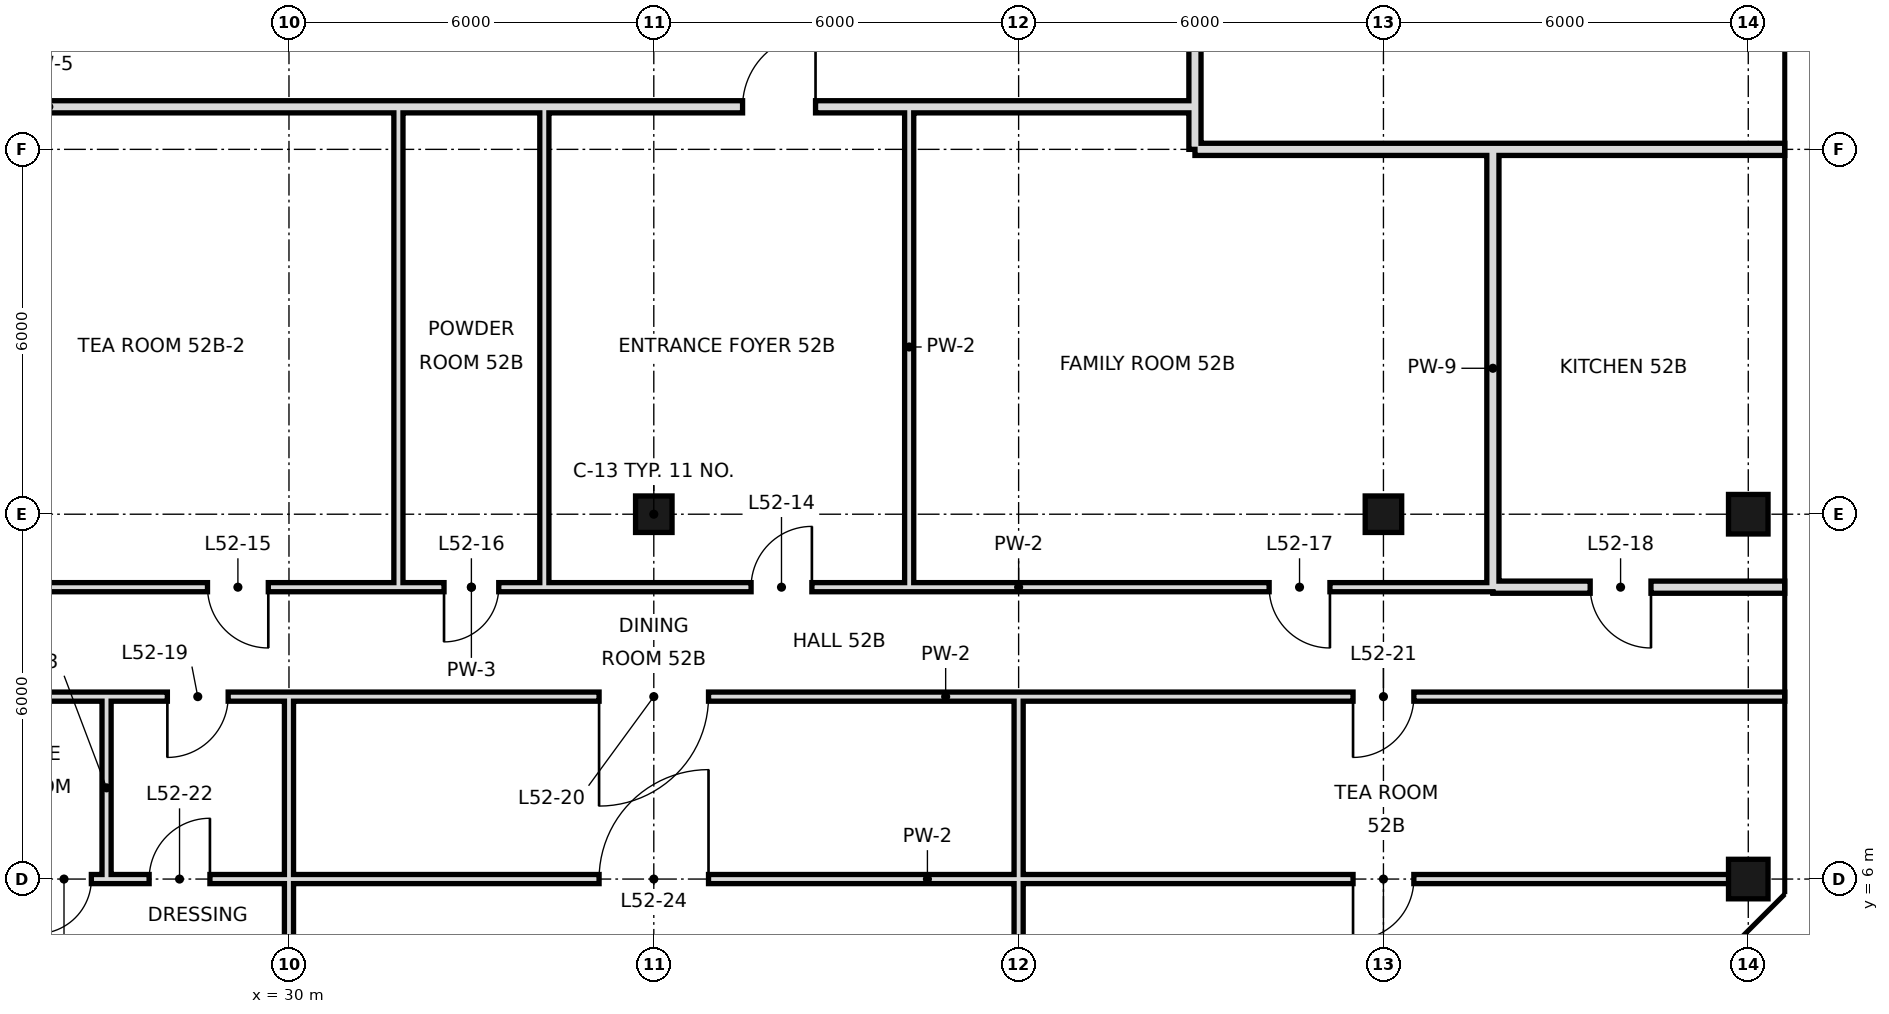
"""IFC4 building model, lengths in metres.
Left out: names, types, materials, properties, quantities, classifications, styles, units other than length and angle.
Written with IfcOpenShell. Run it as: python <this file> out.ifc"""

import sys

from ifc_helpers import new_model, si_unit, direction, frame, frame_2d, origin, origin_2d, place, context, subcontext, project, spatial, rectangle, hollow_rectangle, extrude, element, fill, save


model = new_model("IFC4")
c1 = context("Model", 3, precision=1e-05, world=origin(), true_north=direction((0.0, 1.0)))
c2 = subcontext(c1, "Body", "Model", "MODEL_VIEW")
j1 = project(units=[si_unit("LENGTHUNIT", "METRE"), si_unit("PLANEANGLEUNIT", "RADIAN")], contexts=[c1])
p1 = place(None, origin())
s1 = spatial("IfcSite", under=j1, at=p1, CompositionType="ELEMENT")
p2 = place(p1, origin())
s2 = spatial("IfcBuilding", under=s1, at=p2, CompositionType="ELEMENT")
p3 = place(p2, frame((0.0, 0.0, 222.6)))
s3 = spatial("IfcBuildingStorey", under=s2, at=p3, CompositionType="ELEMENT", Elevation=222.6)
for number, where, z_axis, x_axis in (
    (1, (36.0, 12.0, 0.0), (0.0, 0.0, 1.0), (1.0, 0.0, 0.0)),
    (2, (48.0, 12.0, 0.0), (0.0, 0.0, 1.0), (1.0, 0.0, 0.0)),
):
    element("IfcColumn", number, at=place(p3, frame(where, z_axis=z_axis, x_axis=x_axis)), inside=s3, PredefinedType="COLUMN", context=c2, shape_type="SweptSolid", body=[
        extrude(hollow_rectangle(XDim=0.6, YDim=0.6, WallThickness=0.028, at=origin_2d()), origin(), (0.0, 0.0, 1.0), 3.6),
    ])
for number, where, z_axis, x_axis in (
    (3, (54.0, 6.0, 0.0), (0.0, 0.0, 1.0), (1.0, 0.0, 0.0)),
    (4, (54.0, 12.0, 0.0), (0.0, 0.0, 1.0), (1.0, 0.0, 0.0)),
):
    element("IfcColumn", number, at=place(p3, frame(where, z_axis=z_axis, x_axis=x_axis)), inside=s3, PredefinedType="COLUMN", context=c2, shape_type="SweptSolid", body=[
        extrude(hollow_rectangle(XDim=0.65, YDim=0.65, WallThickness=0.032, at=origin_2d()), origin(), (0.0, 0.0, 1.0), 3.6),
    ])
p4 = place(p3, frame((27.0, 6.0, 0.0), z_axis=(0.0, 0.0, 1.0), x_axis=(0.0, 1.0, 0.0)))
e5 = element("IfcWall", 5, at=p4, inside=s3, PredefinedType="PARTITIONING", context=c2, shape_type="SweptSolid", body=[
    extrude(rectangle(XDim=3.0, YDim=0.15, at=frame_2d((1.5, 0.0))), origin(), (0.0, 0.0, 1.0), 3.42),
])
p5 = place(p3, frame((30.0, -0.6, 0.0), z_axis=(0.0, 0.0, 1.0), x_axis=(0.0, 1.0, 0.0)))
e6 = element("IfcWall", 6, at=p5, inside=s3, PredefinedType="PARTITIONING", context=c2, shape_type="SweptSolid", body=[
    extrude(rectangle(XDim=9.6, YDim=0.15, at=frame_2d((4.8, 0.0))), origin(), (0.0, 0.0, 1.0), 2.72),
])
for number, where, z_axis, x_axis in (
    (7, (31.8, 10.8, 0.0), (0.0, 0.0, 1.0), (0.0, 1.0, 0.0)),
    (8, (34.2, 10.8, 0.0), (0.0, 0.0, 1.0), (0.0, 1.0, 0.0)),
    (9, (40.2, 10.8, 0.0), (0.0, 0.0, 1.0), (0.0, 1.0, 0.0)),
):
    element("IfcWall", number, at=place(p3, frame(where, z_axis=z_axis, x_axis=x_axis)), inside=s3, PredefinedType="PARTITIONING", context=c2, shape_type="SweptSolid", body=[
        extrude(rectangle(XDim=7.9, YDim=0.15, at=frame_2d((3.95, 0.0))), origin(), (0.0, 0.0, 1.0), 3.42),
    ])
p6 = place(p3, frame((42.0, -0.6, 0.0), z_axis=(0.0, 0.0, 1.0), x_axis=(0.0, 1.0, 0.0)))
e10 = element("IfcWall", 10, at=p6, inside=s3, PredefinedType="PARTITIONING", context=c2, shape_type="SweptSolid", body=[
    extrude(rectangle(XDim=9.6, YDim=0.15, at=frame_2d((4.8, 0.0))), origin(), (0.0, 0.0, 1.0), 2.72),
])
p7 = place(p3, frame((44.9, 18.0, 0.0), z_axis=(0.0, 0.0, 1.0), x_axis=(0.0, 1.0, 0.0)))
e11 = element("IfcWall", 11, at=p7, inside=s3, PredefinedType="SOLIDWALL", context=c2, shape_type="SweptSolid", body=[
    extrude(rectangle(XDim=30.6, YDim=0.2, at=frame_2d((15.3, 0.0))), origin(), (0.0, 0.0, 1.0), 2.72),
])
p8 = place(p7, frame((14.75, 0.0, 0.0)))
e12 = element("IfcOpeningElement", 12, at=p8, cuts=e11, PredefinedType="OPENING", context=c2, shape_type="SweptSolid", body=[
    extrude(rectangle(XDim=1.2, YDim=2.4, at=frame_2d((0.6, 1.2))), frame((0.0, 0.11, 0.0), z_axis=(0.0, -1.0, 0.0), x_axis=(1.0, 0.0, 0.0)), (0.0, 0.0, 1.0), 0.22),
])
p9 = place(p3, frame((49.8, 10.8, 0.0), z_axis=(0.0, 0.0, 1.0), x_axis=(0.0, 1.0, 0.0)))
e13 = element("IfcWall", 13, at=p9, inside=s3, PredefinedType="SOLIDWALL", context=c2, shape_type="SweptSolid", body=[
    extrude(rectangle(XDim=7.2, YDim=0.2, at=frame_2d((3.6, 0.0))), origin(), (0.0, 0.0, 1.0), 2.97),
])
p10 = place(p3, frame((49.8, 10.8, 0.0), z_axis=(0.0, 0.0, 1.0), x_axis=(1.0, 0.0, 0.0)))
e14 = element("IfcWall", 14, at=p10, inside=s3, PredefinedType="SOLIDWALL", context=c2, shape_type="SweptSolid", body=[
    extrude(rectangle(XDim=4.8, YDim=0.2, at=frame_2d((2.4, 0.0))), origin(), (0.0, 0.0, 1.0), 2.97),
])
p11 = place(p10, frame((1.6, 0.0, 0.0)))
e15 = element("IfcOpeningElement", 15, at=p11, cuts=e14, PredefinedType="OPENING", context=c2, shape_type="SweptSolid", body=[
    extrude(rectangle(XDim=1.0, YDim=2.4, at=frame_2d((0.5, 1.2))), frame((0.0, 0.11, 0.0), z_axis=(0.0, -1.0, 0.0), x_axis=(1.0, 0.0, 0.0)), (0.0, 0.0, 1.0), 0.22),
])
p12 = place(p3, frame((7.2, 10.8, 0.0), z_axis=(0.0, 0.0, 1.0), x_axis=(1.0, 0.0, 0.0)))
e16 = element("IfcWall", 16, at=p12, inside=s3, PredefinedType="PARTITIONING", context=c2, shape_type="SweptSolid", body=[
    extrude(rectangle(XDim=24.6, YDim=0.15, at=frame_2d((12.3, 0.0))), origin(), (0.0, 0.0, 1.0), 3.42),
])
p13 = place(p12, frame((1.6, 0.0, 0.0)))
e17 = element("IfcOpeningElement", 17, at=p13, cuts=e16, PredefinedType="OPENING", context=c2, shape_type="SweptSolid", body=[
    extrude(rectangle(XDim=1.0, YDim=2.4, at=frame_2d((0.5, 1.2))), frame((0.0, 0.085, 0.0), z_axis=(0.0, -1.0, 0.0), x_axis=(1.0, 0.0, 0.0)), (0.0, 0.0, 1.0), 0.17),
])
p14 = place(p12, frame((9.04, 0.0, 0.0)))
e18 = element("IfcOpeningElement", 18, at=p14, cuts=e16, PredefinedType="OPENING", context=c2, shape_type="SweptSolid", body=[
    extrude(rectangle(XDim=1.0, YDim=2.4, at=frame_2d((0.5, 1.2))), frame((0.0, 0.085, 0.0), z_axis=(0.0, -1.0, 0.0), x_axis=(1.0, 0.0, 0.0)), (0.0, 0.0, 1.0), 0.17),
])
p15 = place(p12, frame((21.46, 0.0, 0.0)))
e19 = element("IfcOpeningElement", 19, at=p15, cuts=e16, PredefinedType="OPENING", context=c2, shape_type="SweptSolid", body=[
    extrude(rectangle(XDim=1.0, YDim=2.4, at=frame_2d((0.5, 1.2))), frame((0.0, 0.085, 0.0), z_axis=(0.0, -1.0, 0.0), x_axis=(1.0, 0.0, 0.0)), (0.0, 0.0, 1.0), 0.17),
])
p16 = place(p3, frame((34.2, 10.8, 0.0), z_axis=(0.0, 0.0, 1.0), x_axis=(1.0, 0.0, 0.0)))
e20 = element("IfcWall", 20, at=p16, inside=s3, PredefinedType="PARTITIONING", context=c2, shape_type="SweptSolid", body=[
    extrude(rectangle(XDim=15.6, YDim=0.15, at=frame_2d((7.8, 0.0))), origin(), (0.0, 0.0, 1.0), 3.42),
])
p17 = place(p16, frame((3.4, 0.0, 0.0)))
e21 = element("IfcOpeningElement", 21, at=p17, cuts=e20, PredefinedType="OPENING", context=c2, shape_type="SweptSolid", body=[
    extrude(rectangle(XDim=1.0, YDim=2.4, at=frame_2d((0.5, 1.2))), frame((0.0, 0.085, 0.0), z_axis=(0.0, -1.0, 0.0), x_axis=(1.0, 0.0, 0.0)), (0.0, 0.0, 1.0), 0.17),
])
p18 = place(p16, frame((11.92, 0.0, 0.0)))
e22 = element("IfcOpeningElement", 22, at=p18, cuts=e20, PredefinedType="OPENING", context=c2, shape_type="SweptSolid", body=[
    extrude(rectangle(XDim=1.0, YDim=2.4, at=frame_2d((0.5, 1.2))), frame((0.0, 0.085, 0.0), z_axis=(0.0, -1.0, 0.0), x_axis=(1.0, 0.0, 0.0)), (0.0, 0.0, 1.0), 0.17),
])
p19 = place(p3, frame((31.8, 10.8, 0.0), z_axis=(0.0, 0.0, 1.0), x_axis=(1.0, 0.0, 0.0)))
e23 = element("IfcWall", 23, at=p19, inside=s3, PredefinedType="PARTITIONING", context=c2, shape_type="SweptSolid", body=[
    extrude(rectangle(XDim=2.4, YDim=0.15, at=frame_2d((1.2, 0.0))), origin(), (0.0, 0.0, 1.0), 3.42),
])
p20 = place(p19, frame((0.75, 0.0, 0.0)))
e24 = element("IfcOpeningElement", 24, at=p20, cuts=e23, PredefinedType="OPENING", context=c2, shape_type="SweptSolid", body=[
    extrude(rectangle(XDim=0.9, YDim=2.4, at=frame_2d((0.45, 1.2))), frame((0.0, 0.085, 0.0), z_axis=(0.0, -1.0, 0.0), x_axis=(1.0, 0.0, 0.0)), (0.0, 0.0, 1.0), 0.17),
])
p21 = place(p3, frame((44.9, 18.0, 0.0), z_axis=(0.0, 0.0, 1.0), x_axis=(1.0, 0.0, 0.0)))
e25 = element("IfcWall", 25, at=p21, inside=s3, PredefinedType="SOLIDWALL", context=c2, shape_type="SweptSolid", body=[
    extrude(rectangle(XDim=4.9, YDim=0.2, at=frame_2d((2.45, 0.0))), origin(), (0.0, 0.0, 1.0), 2.72),
])
p22 = place(p3, frame((49.8, 18.0, 0.0), z_axis=(0.0, 0.0, 1.0), x_axis=(1.0, 0.0, 0.0)))
e26 = element("IfcWall", 26, at=p22, inside=s3, PredefinedType="SOLIDWALL", context=c2, shape_type="SweptSolid", body=[
    extrude(rectangle(XDim=4.8, YDim=0.2, at=frame_2d((2.4, 0.0))), origin(), (0.0, 0.0, 1.0), 2.72),
])
p23 = place(p3, frame((7.2, 18.7, 0.0), z_axis=(0.0, 0.0, 1.0), x_axis=(1.0, 0.0, 0.0)))
e27 = element("IfcWall", 27, at=p23, inside=s3, PredefinedType="SOLIDWALL", context=c2, shape_type="SweptSolid", body=[
    extrude(rectangle(XDim=37.7, YDim=0.2, at=frame_2d((18.85, 0.0))), origin(), (0.0, 0.0, 1.0), 2.72),
])
p24 = place(p23, frame((1.54, 0.0, 0.0)))
e28 = element("IfcOpeningElement", 28, at=p24, cuts=e27, PredefinedType="OPENING", context=c2, shape_type="SweptSolid", body=[
    extrude(rectangle(XDim=1.2, YDim=2.4, at=frame_2d((0.6, 1.2))), frame((0.0, 0.11, 0.0), z_axis=(0.0, -1.0, 0.0), x_axis=(1.0, 0.0, 0.0)), (0.0, 0.0, 1.0), 0.22),
])
p25 = place(p23, frame((30.26, 0.0, 0.0)))
e29 = element("IfcOpeningElement", 29, at=p25, cuts=e27, PredefinedType="OPENING", context=c2, shape_type="SweptSolid", body=[
    extrude(rectangle(XDim=1.2, YDim=2.4, at=frame_2d((0.6, 1.2))), frame((0.0, 0.11, 0.0), z_axis=(0.0, -1.0, 0.0), x_axis=(1.0, 0.0, 0.0)), (0.0, 0.0, 1.0), 0.22),
])
p26 = place(p3, frame((27.0, 6.0, 0.0), z_axis=(0.0, 0.0, 1.0), x_axis=(1.0, 0.0, 0.0)))
e30 = element("IfcWall", 30, at=p26, inside=s3, PredefinedType="PARTITIONING", context=c2, shape_type="SweptSolid", body=[
    extrude(rectangle(XDim=27.0, YDim=0.15, at=frame_2d((13.5, 0.0))), origin(), (0.0, 0.0, 1.0), 2.97),
])
p27 = place(p26, frame((0.7, 0.0, 0.0)))
e31 = element("IfcOpeningElement", 31, at=p27, cuts=e30, PredefinedType="OPENING", context=c2, shape_type="SweptSolid", body=[
    extrude(rectangle(XDim=1.0, YDim=2.4, at=frame_2d((0.5, 1.2))), frame((0.0, 0.085, 0.0), z_axis=(0.0, -1.0, 0.0), x_axis=(1.0, 0.0, 0.0)), (0.0, 0.0, 1.0), 0.17),
])
p28 = place(p26, frame((8.1, 0.0, 0.0)))
e32 = element("IfcOpeningElement", 32, at=p28, cuts=e30, PredefinedType="OPENING", context=c2, shape_type="SweptSolid", body=[
    extrude(rectangle(XDim=1.8, YDim=2.4, at=frame_2d((0.9, 1.2))), frame((0.0, 0.085, 0.0), z_axis=(0.0, -1.0, 0.0), x_axis=(1.0, 0.0, 0.0)), (0.0, 0.0, 1.0), 0.17),
])
p29 = place(p26, frame((20.5, 0.0, 0.0)))
e33 = element("IfcOpeningElement", 33, at=p29, cuts=e30, PredefinedType="OPENING", context=c2, shape_type="SweptSolid", body=[
    extrude(rectangle(XDim=1.0, YDim=2.4, at=frame_2d((0.5, 1.2))), frame((0.0, 0.085, 0.0), z_axis=(0.0, -1.0, 0.0), x_axis=(1.0, 0.0, 0.0)), (0.0, 0.0, 1.0), 0.17),
])
p30 = place(p3, frame((24.0, 6.0, 0.0), z_axis=(0.0, 0.0, 1.0), x_axis=(1.0, 0.0, 0.0)))
e34 = element("IfcWall", 34, at=p30, inside=s3, PredefinedType="PARTITIONING", context=c2, shape_type="SweptSolid", body=[
    extrude(rectangle(XDim=3.0, YDim=0.15, at=frame_2d((1.5, 0.0))), origin(), (0.0, 0.0, 1.0), 2.97),
])
p31 = place(p30, frame((1.85, 0.0, 0.0)))
e35 = element("IfcOpeningElement", 35, at=p31, cuts=e34, PredefinedType="OPENING", context=c2, shape_type="SweptSolid", body=[
    extrude(rectangle(XDim=0.9, YDim=2.4, at=frame_2d((0.45, 1.2))), frame((0.0, 0.085, 0.0), z_axis=(0.0, -1.0, 0.0), x_axis=(1.0, 0.0, 0.0)), (0.0, 0.0, 1.0), 0.17),
])
p32 = place(p3, frame((27.0, 9.0, 0.0), z_axis=(0.0, 0.0, 1.0), x_axis=(1.0, 0.0, 0.0)))
e36 = element("IfcWall", 36, at=p32, inside=s3, PredefinedType="PARTITIONING", context=c2, shape_type="SweptSolid", body=[
    extrude(rectangle(XDim=27.6, YDim=0.15, at=frame_2d((13.8, 0.0))), origin(), (0.0, 0.0, 1.0), 3.42),
])
p33 = place(p32, frame((1.0, 0.0, 0.0)))
e37 = element("IfcOpeningElement", 37, at=p33, cuts=e36, PredefinedType="OPENING", context=c2, shape_type="SweptSolid", body=[
    extrude(rectangle(XDim=1.0, YDim=2.4, at=frame_2d((0.5, 1.2))), frame((0.0, 0.085, 0.0), z_axis=(0.0, -1.0, 0.0), x_axis=(1.0, 0.0, 0.0)), (0.0, 0.0, 1.0), 0.17),
])
p34 = place(p32, frame((8.1, 0.0, 0.0)))
e38 = element("IfcOpeningElement", 38, at=p34, cuts=e36, PredefinedType="OPENING", context=c2, shape_type="SweptSolid", body=[
    extrude(rectangle(XDim=1.8, YDim=2.4, at=frame_2d((0.9, 1.2))), frame((0.0, 0.085, 0.0), z_axis=(0.0, -1.0, 0.0), x_axis=(1.0, 0.0, 0.0)), (0.0, 0.0, 1.0), 0.17),
])
p35 = place(p32, frame((20.5, 0.0, 0.0)))
e39 = element("IfcOpeningElement", 39, at=p35, cuts=e36, PredefinedType="OPENING", context=c2, shape_type="SweptSolid", body=[
    extrude(rectangle(XDim=1.0, YDim=2.4, at=frame_2d((0.5, 1.2))), frame((0.0, 0.085, 0.0), z_axis=(0.0, -1.0, 0.0), x_axis=(1.0, 0.0, 0.0)), (0.0, 0.0, 1.0), 0.17),
])
p36 = place(p3, frame((24.0, 9.0, 0.0), z_axis=(0.0, 0.0, 1.0), x_axis=(1.0, 0.0, 0.0)))
e40 = element("IfcWall", 40, at=p36, inside=s3, PredefinedType="PARTITIONING", context=c2, shape_type="SweptSolid", body=[
    extrude(rectangle(XDim=3.0, YDim=0.15, at=frame_2d((1.5, 0.0))), origin(), (0.0, 0.0, 1.0), 3.42),
])
p37 = place(p17, frame((1.0, 0.0, 0.0), z_axis=(0.0, 0.0, 1.0), x_axis=(-1.0, 0.0, 0.0)))
e41 = element("IfcDoor", 41, at=p37, inside=s3, OperationType="SINGLE_SWING_LEFT", PredefinedType="DOOR", context=c2, shape_type="SweptSolid", body=[
    extrude(rectangle(XDim=1.0, YDim=2.4, at=frame_2d((0.5, 1.2))), frame((0.0, 0.025, 0.0), z_axis=(0.0, -1.0, 0.0), x_axis=(1.0, 0.0, 0.0)), (0.0, 0.0, 1.0), 0.05),
])
fill(e21, e41)
p38 = place(p15, origin())
e42 = element("IfcDoor", 42, at=p38, inside=s3, OperationType="SINGLE_SWING_RIGHT", PredefinedType="DOOR", context=c2, shape_type="SweptSolid", body=[
    extrude(rectangle(XDim=1.0, YDim=2.4, at=frame_2d((0.5, 1.2))), frame((0.0, 0.025, 0.0), z_axis=(0.0, -1.0, 0.0), x_axis=(1.0, 0.0, 0.0)), (0.0, 0.0, 1.0), 0.05),
])
fill(e19, e42)
p39 = place(p20, frame((0.9, 0.0, 0.0), z_axis=(0.0, 0.0, 1.0), x_axis=(-1.0, 0.0, 0.0)))
e43 = element("IfcDoor", 43, at=p39, inside=s3, OperationType="SINGLE_SWING_RIGHT", PredefinedType="DOOR", context=c2, shape_type="SweptSolid", body=[
    extrude(rectangle(XDim=0.9, YDim=2.4, at=frame_2d((0.45, 1.2))), frame((0.0, 0.025, 0.0), z_axis=(0.0, -1.0, 0.0), x_axis=(1.0, 0.0, 0.0)), (0.0, 0.0, 1.0), 0.05),
])
fill(e24, e43)
p40 = place(p18, origin())
e44 = element("IfcDoor", 44, at=p40, inside=s3, OperationType="SINGLE_SWING_RIGHT", PredefinedType="DOOR", context=c2, shape_type="SweptSolid", body=[
    extrude(rectangle(XDim=1.0, YDim=2.4, at=frame_2d((0.5, 1.2))), frame((0.0, 0.025, 0.0), z_axis=(0.0, -1.0, 0.0), x_axis=(1.0, 0.0, 0.0)), (0.0, 0.0, 1.0), 0.05),
])
fill(e22, e44)
p41 = place(p11, origin())
e45 = element("IfcDoor", 45, at=p41, inside=s3, OperationType="SINGLE_SWING_RIGHT", PredefinedType="DOOR", context=c2, shape_type="SweptSolid", body=[
    extrude(rectangle(XDim=1.0, YDim=2.4, at=frame_2d((0.5, 1.2))), frame((0.0, 0.025, 0.0), z_axis=(0.0, -1.0, 0.0), x_axis=(1.0, 0.0, 0.0)), (0.0, 0.0, 1.0), 0.05),
])
fill(e15, e45)
p42 = place(p33, frame((1.0, 0.0, 0.0), z_axis=(0.0, 0.0, 1.0), x_axis=(-1.0, 0.0, 0.0)))
e46 = element("IfcDoor", 46, at=p42, inside=s3, OperationType="SINGLE_SWING_RIGHT", PredefinedType="DOOR", context=c2, shape_type="SweptSolid", body=[
    extrude(rectangle(XDim=1.0, YDim=2.4, at=frame_2d((0.5, 1.2))), frame((0.0, 0.025, 0.0), z_axis=(0.0, -1.0, 0.0), x_axis=(1.0, 0.0, 0.0)), (0.0, 0.0, 1.0), 0.05),
])
fill(e37, e46)
p43 = place(p34, frame((1.8, 0.0, 0.0), z_axis=(0.0, 0.0, 1.0), x_axis=(-1.0, 0.0, 0.0)))
e47 = element("IfcDoor", 47, at=p43, inside=s3, OperationType="SINGLE_SWING_RIGHT", PredefinedType="DOOR", context=c2, shape_type="SweptSolid", body=[
    extrude(rectangle(XDim=1.8, YDim=2.4, at=frame_2d((0.9, 1.2))), frame((0.0, 0.025, 0.0), z_axis=(0.0, -1.0, 0.0), x_axis=(1.0, 0.0, 0.0)), (0.0, 0.0, 1.0), 0.05),
])
fill(e38, e47)
p44 = place(p35, frame((1.0, 0.0, 0.0), z_axis=(0.0, 0.0, 1.0), x_axis=(-1.0, 0.0, 0.0)))
e48 = element("IfcDoor", 48, at=p44, inside=s3, OperationType="SINGLE_SWING_RIGHT", PredefinedType="DOOR", context=c2, shape_type="SweptSolid", body=[
    extrude(rectangle(XDim=1.0, YDim=2.4, at=frame_2d((0.5, 1.2))), frame((0.0, 0.025, 0.0), z_axis=(0.0, -1.0, 0.0), x_axis=(1.0, 0.0, 0.0)), (0.0, 0.0, 1.0), 0.05),
])
fill(e39, e48)
p45 = place(p27, frame((1.0, 0.0, 0.0), z_axis=(0.0, 0.0, 1.0), x_axis=(-1.0, 0.0, 0.0)))
e49 = element("IfcDoor", 49, at=p45, inside=s3, OperationType="SINGLE_SWING_LEFT", PredefinedType="DOOR", context=c2, shape_type="SweptSolid", body=[
    extrude(rectangle(XDim=1.0, YDim=2.4, at=frame_2d((0.5, 1.2))), frame((0.0, 0.025, 0.0), z_axis=(0.0, -1.0, 0.0), x_axis=(1.0, 0.0, 0.0)), (0.0, 0.0, 1.0), 0.05),
])
fill(e31, e49)
p46 = place(p31, frame((0.9, 0.0, 0.0), z_axis=(0.0, 0.0, 1.0), x_axis=(-1.0, 0.0, 0.0)))
e50 = element("IfcDoor", 50, at=p46, inside=s3, OperationType="SINGLE_SWING_RIGHT", PredefinedType="DOOR", context=c2, shape_type="SweptSolid", body=[
    extrude(rectangle(XDim=0.9, YDim=2.4, at=frame_2d((0.45, 1.2))), frame((0.0, 0.025, 0.0), z_axis=(0.0, -1.0, 0.0), x_axis=(1.0, 0.0, 0.0)), (0.0, 0.0, 1.0), 0.05),
])
fill(e35, e50)
p47 = place(p28, frame((1.8, 0.0, 0.0), z_axis=(0.0, 0.0, 1.0), x_axis=(-1.0, 0.0, 0.0)))
e51 = element("IfcDoor", 51, at=p47, inside=s3, OperationType="SINGLE_SWING_LEFT", PredefinedType="DOOR", context=c2, shape_type="SweptSolid", body=[
    extrude(rectangle(XDim=1.8, YDim=2.4, at=frame_2d((0.9, 1.2))), frame((0.0, 0.025, 0.0), z_axis=(0.0, -1.0, 0.0), x_axis=(1.0, 0.0, 0.0)), (0.0, 0.0, 1.0), 0.05),
])
fill(e32, e51)
p48 = place(p29, frame((1.0, 0.0, 0.0), z_axis=(0.0, 0.0, 1.0), x_axis=(-1.0, 0.0, 0.0)))
e52 = element("IfcDoor", 52, at=p48, inside=s3, OperationType="SINGLE_SWING_RIGHT", PredefinedType="DOOR", context=c2, shape_type="SweptSolid", body=[
    extrude(rectangle(XDim=1.0, YDim=2.4, at=frame_2d((0.5, 1.2))), frame((0.0, 0.025, 0.0), z_axis=(0.0, -1.0, 0.0), x_axis=(1.0, 0.0, 0.0)), (0.0, 0.0, 1.0), 0.05),
])
fill(e33, e52)
p49 = place(p25, frame((1.2, 0.0, 0.0), z_axis=(0.0, 0.0, 1.0), x_axis=(-1.0, 0.0, 0.0)))
e53 = element("IfcDoor", 53, at=p49, inside=s3, OperationType="SINGLE_SWING_LEFT", PredefinedType="DOOR", context=c2, shape_type="SweptSolid", body=[
    extrude(rectangle(XDim=1.2, YDim=2.4, at=frame_2d((0.6, 1.2))), frame((0.0, 0.025, 0.0), z_axis=(0.0, -1.0, 0.0), x_axis=(1.0, 0.0, 0.0)), (0.0, 0.0, 1.0), 0.05),
])
fill(e29, e53)
save(model, sys.argv[1])
